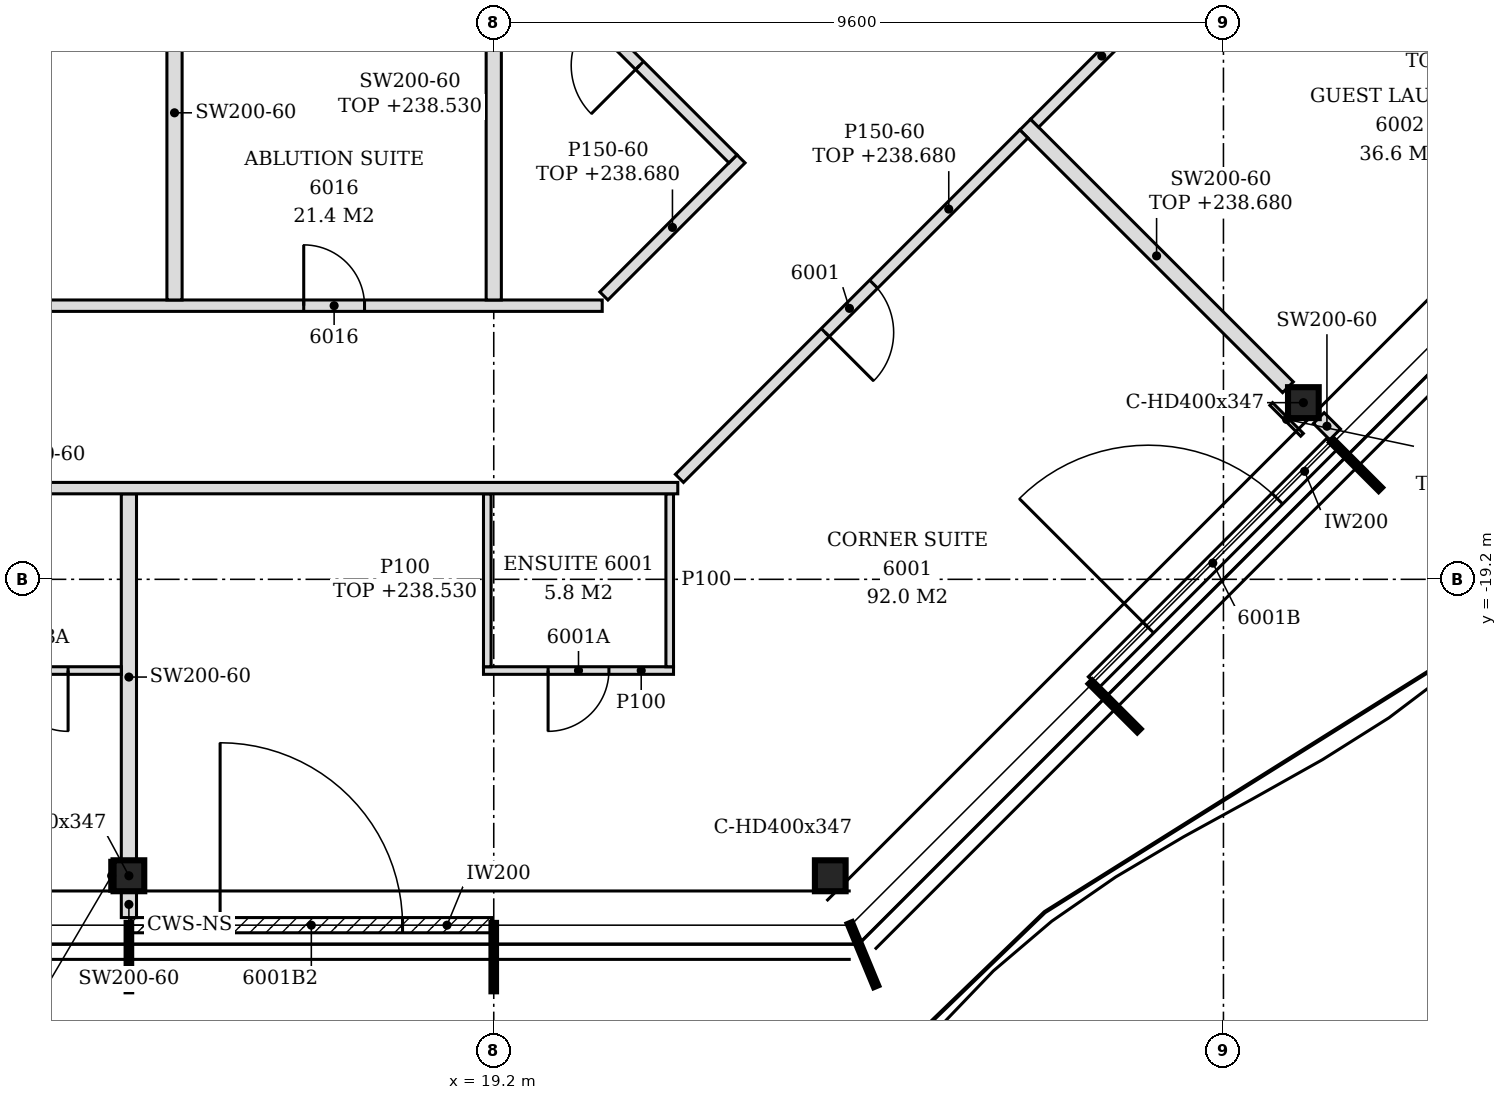
"""IFC4 building model, lengths in metres.
Left out: names, types, materials, properties, quantities, classifications, styles, units other than length and angle.
Written with IfcOpenShell. Run it as: python <this file> out.ifc"""

import sys

from ifc_helpers import new_model, si_unit, direction, frame, frame_2d, origin, origin_2d, place, context, subcontext, project, spatial, polyline, rectangle, i_section, outline, extrude, element, fill, save


model = new_model("IFC4")
c1 = context("Model", 3, precision=1e-05, world=origin(), true_north=direction((0.0, 1.0)))
c2 = subcontext(c1, "Body", "Model", "MODEL_VIEW")
j1 = project(units=[si_unit("LENGTHUNIT", "METRE"), si_unit("PLANEANGLEUNIT", "RADIAN")], contexts=[c1])
p1 = place(None, origin())
s1 = spatial("IfcSite", under=j1, at=p1, CompositionType="ELEMENT")
p2 = place(p1, origin())
s2 = spatial("IfcBuilding", under=s1, at=p2, CompositionType="ELEMENT")
p3 = place(p2, frame((0.0, 0.0, 235.8)))
s3 = spatial("IfcBuildingStorey", under=s2, at=p3, CompositionType="ELEMENT", Elevation=235.8)
for number, where, z_axis, x_axis in (
    (1, (14.4, -23.1, -0.15), (0.0, 0.0, 1.0), (1.0, 0.0, 0.0)),
    (2, (23.627, -23.1, -0.15), (0.0, 0.0, 1.0), (1.0, 0.0, 0.0)),
    (3, (29.852, -16.876, -0.15), (0.0, 0.0, 1.0), (1.0, 0.0, 0.0)),
):
    element("IfcColumn", number, at=place(p3, frame(where, z_axis=z_axis, x_axis=x_axis)), inside=s3, PredefinedType="COLUMN", context=c2, shape_type="SweptSolid", body=[
        extrude(i_section(OverallWidth=0.404, OverallDepth=0.407, WebThickness=0.027, FlangeThickness=0.044, FilletRadius=0.015, at=origin_2d()), origin(), (0.0, 0.0, 1.0), 3.6),
    ])
p4 = place(p3, frame((14.43, -23.75, 0.0), z_axis=(0.0, 0.0, 1.0), x_axis=(1.0, 0.0, 0.0)))
e4 = element("IfcWall", 4, at=p4, inside=s3, PredefinedType="NOTDEFINED", context=c2, shape_type="SweptSolid", body=[
    extrude(rectangle(XDim=4.74, YDim=0.2, at=frame_2d((2.37, 0.0))), origin(), (0.0, 0.0, 1.0), 3.45),
])
p5 = place(p4, frame((1.17, 0.0, 0.0)))
e5 = element("IfcOpeningElement", 5, at=p5, cuts=e4, PredefinedType="OPENING", context=c2, shape_type="SweptSolid", body=[
    extrude(rectangle(XDim=2.4, YDim=2.4, at=frame_2d((1.2, 1.2))), frame((0.0, 0.11, 0.0), z_axis=(0.0, -1.0, 0.0), x_axis=(1.0, 0.0, 0.0)), (0.0, 0.0, 1.0), 0.22),
])
p6 = place(p3, frame((27.093, -20.553, 0.0), z_axis=(0.0, 0.0, 1.0), x_axis=(0.707079231393, 0.707134329907, 0.0)))
e6 = element("IfcWall", 6, at=p6, inside=s3, PredefinedType="NOTDEFINED", context=c2, shape_type="SweptSolid", body=[
    extrude(rectangle(XDim=4.431, YDim=0.2, at=frame_2d((2.215, 0.0))), origin(), (0.0, 0.0, 1.0), 3.45),
])
p7 = place(p6, frame((1.015, 0.0, 0.0)))
e7 = element("IfcOpeningElement", 7, at=p7, cuts=e6, PredefinedType="OPENING", context=c2, shape_type="SweptSolid", body=[
    extrude(rectangle(XDim=2.4, YDim=2.4, at=frame_2d((1.2, 1.2))), frame((0.0, 0.11, 0.0), z_axis=(0.0, -1.0, 0.0), x_axis=(1.0, 0.0, 0.0)), (0.0, 0.0, 1.0), 0.22),
])
p8 = place(p3, frame((14.4, -23.65, 0.0), z_axis=(0.0, 0.0, 1.0), x_axis=(0.0, 1.0, 0.0)))
e8 = element("IfcWall", 8, at=p8, inside=s3, PredefinedType="PARTITIONING", context=c2, shape_type="SweptSolid", body=[
    extrude(rectangle(XDim=0.346, YDim=0.2, at=frame_2d((0.173, 0.0))), origin(), (0.0, 0.0, 1.0), 3.45),
])
p9 = place(p3, frame((14.4, -22.896, 0.0), z_axis=(0.0, 0.0, 1.0), x_axis=(0.0, 1.0, 0.0)))
e9 = element("IfcWall", 9, at=p9, inside=s3, PredefinedType="PARTITIONING", context=c2, shape_type="SweptSolid", body=[
    extrude(outline(polyline([(0.0, 0.0), (4.822, 0.0), (4.822, 3.45), (3.802, 3.45), (3.8, 2.88), (3.592, 2.88), (3.59, 3.45), (0.0, 3.45), (0.0, 0.0)])), frame((0.0, 0.1, 0.0), z_axis=(0.0, -1.0, 0.0), x_axis=(1.0, 0.0, 0.0)), (0.0, 0.0, 1.0), 0.2),
])
p10 = place(p3, frame((11.95, -20.4, 0.0), z_axis=(0.0, 0.0, 1.0), x_axis=(1.0, 0.0, 0.0)))
e10 = element("IfcWall", 10, at=p10, inside=s3, PredefinedType="PARTITIONING", context=c2, shape_type="SweptSolid", body=[
    extrude(rectangle(XDim=2.35, YDim=0.1, at=frame_2d((1.175, 0.0))), origin(), (0.0, 0.0, 1.0), 3.45),
])
p11 = place(p10, frame((0.85, 0.0, 0.0)))
e11 = element("IfcOpeningElement", 11, at=p11, cuts=e10, PredefinedType="OPENING", context=c2, shape_type="SweptSolid", body=[
    extrude(rectangle(XDim=0.8, YDim=2.1, at=frame_2d((0.4, 1.05))), frame((0.0, 0.06, 0.0), z_axis=(0.0, -1.0, 0.0), x_axis=(1.0, 0.0, 0.0)), (0.0, 0.0, 1.0), 0.12),
])
p12 = place(p3, frame((19.065, -20.4, 0.0), z_axis=(0.0, 0.0, 1.0), x_axis=(1.0, 0.0, 0.0)))
e12 = element("IfcWall", 12, at=p12, inside=s3, PredefinedType="PARTITIONING", context=c2, shape_type="SweptSolid", body=[
    extrude(outline(polyline([(0.0, 0.0), (2.5, 0.0), (2.5, 3.45), (0.285, 3.45), (0.283, 2.73), (0.0, 2.73), (0.0, 0.0)])), frame((0.0, 0.05, 0.0), z_axis=(0.0, -1.0, 0.0), x_axis=(1.0, 0.0, 0.0)), (0.0, 0.0, 1.0), 0.1),
])
p13 = place(p12, frame((0.85, 0.0, 0.0)))
e13 = element("IfcOpeningElement", 13, at=p13, cuts=e12, PredefinedType="OPENING", context=c2, shape_type="SweptSolid", body=[
    extrude(rectangle(XDim=0.8, YDim=2.1, at=frame_2d((0.4, 1.05))), frame((0.0, 0.06, 0.0), z_axis=(0.0, -1.0, 0.0), x_axis=(1.0, 0.0, 0.0)), (0.0, 0.0, 1.0), 0.12),
])
p14 = place(p3, frame((19.115, -20.35, 0.0), z_axis=(0.0, 0.0, 1.0), x_axis=(0.0, 1.0, 0.0)))
e14 = element("IfcWall", 14, at=p14, inside=s3, PredefinedType="PARTITIONING", context=c2, shape_type="SweptSolid", body=[
    extrude(rectangle(XDim=2.275, YDim=0.1, at=frame_2d((1.138, 0.0))), origin(), (0.0, 0.0, 1.0), 2.73),
])
p15 = place(p3, frame((21.515, -20.35, 0.0), z_axis=(0.0, 0.0, 1.0), x_axis=(0.0, 1.0, 0.0)))
e15 = element("IfcWall", 15, at=p15, inside=s3, PredefinedType="PARTITIONING", context=c2, shape_type="SweptSolid", body=[
    extrude(outline(polyline([(0.0, 0.0), (2.275, 0.0), (2.275, 3.45), (1.245, 3.45), (1.243, 2.98), (1.055, 2.98), (1.053, 3.45), (0.0, 3.45), (0.0, 0.0)])), frame((0.0, 0.05, 0.0), z_axis=(0.0, -1.0, 0.0), x_axis=(1.0, 0.0, 0.0)), (0.0, 0.0, 1.0), 0.1),
])
p16 = place(p3, frame((-0.726, -18.0, 0.0), z_axis=(0.0, 0.0, 1.0), x_axis=(1.0, 0.0, 0.0)))
e16 = element("IfcWall", 16, at=p16, inside=s3, PredefinedType="PARTITIONING", context=c2, shape_type="SweptSolid", body=[
    extrude(outline(polyline([(0.0, 0.0), (22.347, 0.0), (22.347, 3.45), (20.076, 3.45), (20.074, 2.73), (19.776, 2.73), (19.774, 3.45), (8.076, 3.45), (8.074, 2.73), (7.776, 2.73), (7.774, 3.45), (1.086, 3.45), (1.084, 2.93), (0.512, 2.93), (0.51, 3.45), (0.0, 3.45), (0.0, 0.0)])), frame((0.0, 0.075, 0.0), z_axis=(0.0, -1.0, 0.0), x_axis=(1.0, 0.0, 0.0)), (0.0, 0.0, 1.0), 0.15),
])
p17 = place(p16, frame((5.676, 0.0, 0.0)))
e17 = element("IfcOpeningElement", 17, at=p17, cuts=e16, PredefinedType="OPENING", context=c2, shape_type="SweptSolid", body=[
    extrude(rectangle(XDim=0.9, YDim=2.1, at=frame_2d((0.45, 1.05))), frame((0.0, 0.085, 0.0), z_axis=(0.0, -1.0, 0.0), x_axis=(1.0, 0.0, 0.0)), (0.0, 0.0, 1.0), 0.17),
])
p18 = place(p3, frame((21.643, -17.872, 0.0), z_axis=(0.0, 0.0, 1.0), x_axis=(0.707106781187, 0.707106781187, 0.0)))
e18 = element("IfcWall", 18, at=p18, inside=s3, PredefinedType="PARTITIONING", context=c2, shape_type="SweptSolid", body=[
    extrude(rectangle(XDim=6.408, YDim=0.15, at=frame_2d((3.204, 0.0))), origin(), (0.0, 0.0, 1.0), 2.88),
])
p19 = place(p18, frame((2.713, 0.0, 0.0)))
e19 = element("IfcOpeningElement", 19, at=p19, cuts=e18, PredefinedType="OPENING", context=c2, shape_type="SweptSolid", body=[
    extrude(rectangle(XDim=0.9, YDim=2.1, at=frame_2d((0.45, 1.05))), frame((0.0, 0.085, 0.0), z_axis=(0.0, -1.0, 0.0), x_axis=(1.0, 0.0, 0.0)), (0.0, 0.0, 1.0), 0.17),
])
p20 = place(p3, frame((30.269, -17.293, 0.0), z_axis=(0.0, 0.0, 1.0), x_axis=(-0.707509117806, 0.706704215511, 0.0)))
e20 = element("IfcWall", 20, at=p20, inside=s3, PredefinedType="PARTITIONING", context=c2, shape_type="SweptSolid", body=[
    extrude(rectangle(XDim=0.303, YDim=0.2, at=frame_2d((0.152, 0.0))), origin(), (0.0, 0.0, 1.0), 3.45),
])
p21 = place(p3, frame((29.649, -16.673, 0.0), z_axis=(0.0, 0.0, 1.0), x_axis=(-0.707181695824, 0.707031858612, 0.0)))
e21 = element("IfcWall", 21, at=p21, inside=s3, PredefinedType="PARTITIONING", context=c2, shape_type="SweptSolid", body=[
    extrude(rectangle(XDim=4.888, YDim=0.2, at=frame_2d((2.444, 0.0))), origin(), (0.0, 0.0, 1.0), 2.88),
])
p22 = place(p3, frame((-0.312, -15.6, 0.0), z_axis=(0.0, 0.0, 1.0), x_axis=(1.0, 0.0, 0.0)))
e22 = element("IfcWall", 22, at=p22, inside=s3, PredefinedType="PARTITIONING", context=c2, shape_type="SweptSolid", body=[
    extrude(outline(polyline([(0.0, 0.0), (20.939, 0.0), (20.939, 3.45), (19.662, 3.45), (19.66, 2.73), (19.362, 2.73), (19.36, 3.45), (7.662, 3.45), (7.66, 2.73), (7.362, 2.73), (7.36, 3.45), (0.0, 3.45), (0.0, 0.0)])), frame((0.0, 0.075, 0.0), z_axis=(0.0, -1.0, 0.0), x_axis=(1.0, 0.0, 0.0)), (0.0, 0.0, 1.0), 0.15),
])
p23 = place(p22, frame((17.012, 0.0, 0.0)))
e23 = element("IfcOpeningElement", 23, at=p23, cuts=e22, PredefinedType="OPENING", context=c2, shape_type="SweptSolid", body=[
    extrude(rectangle(XDim=0.8, YDim=2.1, at=frame_2d((0.4, 1.05))), frame((0.0, 0.085, 0.0), z_axis=(0.0, -1.0, 0.0), x_axis=(1.0, 0.0, 0.0)), (0.0, 0.0, 1.0), 0.17),
])
p24 = place(p3, frame((15.0, -15.525, 0.0), z_axis=(0.0, 0.0, 1.0), x_axis=(0.0, 1.0, 0.0)))
e24 = element("IfcWall", 24, at=p24, inside=s3, PredefinedType="PARTITIONING", context=c2, shape_type="SweptSolid", body=[
    extrude(outline(polyline([(0.0, 0.0), (4.925, 0.0), (4.925, 3.45), (1.23, 3.45), (1.228, 2.88), (1.02, 2.88), (1.018, 3.45), (0.0, 3.45), (0.0, 0.0)])), frame((0.0, 0.1, 0.0), z_axis=(0.0, -1.0, 0.0), x_axis=(1.0, 0.0, 0.0)), (0.0, 0.0, 1.0), 0.2),
])
p25 = place(p3, frame((19.2, -15.525, 0.0), z_axis=(0.0, 0.0, 1.0), x_axis=(0.0, 1.0, 0.0)))
e25 = element("IfcWall", 25, at=p25, inside=s3, PredefinedType="PARTITIONING", context=c2, shape_type="SweptSolid", body=[
    extrude(rectangle(XDim=4.815, YDim=0.2, at=frame_2d((2.408, 0.0))), origin(), (0.0, 0.0, 1.0), 2.73),
])
p26 = place(p3, frame((20.649, -15.472, 0.0), z_axis=(0.0, 0.0, 1.0), x_axis=(0.707106781187, 0.707106781187, 0.0)))
e26 = element("IfcWall", 26, at=p26, inside=s3, PredefinedType="PARTITIONING", context=c2, shape_type="SweptSolid", body=[
    extrude(rectangle(XDim=2.551, YDim=0.15, at=frame_2d((1.276, 0.0))), origin(), (0.0, 0.0, 1.0), 2.88),
])
p27 = place(p3, frame((22.347, -13.668, 0.0), z_axis=(0.0, 0.0, 1.0), x_axis=(-0.707106781187, 0.707106781187, 0.0)))
e27 = element("IfcWall", 27, at=p27, inside=s3, PredefinedType="PARTITIONING", context=c2, shape_type="SweptSolid", body=[
    extrude(rectangle(XDim=4.45, YDim=0.15, at=frame_2d((2.225, 0.0))), origin(), (0.0, 0.0, 1.0), 2.73),
])
p28 = place(p27, frame((1.737, 0.0, 0.0)))
e28 = element("IfcOpeningElement", 28, at=p28, cuts=e27, PredefinedType="OPENING", context=c2, shape_type="SweptSolid", body=[
    extrude(rectangle(XDim=0.9, YDim=2.1, at=frame_2d((0.45, 1.05))), frame((0.0, 0.085, 0.0), z_axis=(0.0, -1.0, 0.0), x_axis=(1.0, 0.0, 0.0)), (0.0, 0.0, 1.0), 0.17),
])
p29 = place(p3, frame((26.316, -13.199, 0.0), z_axis=(0.0, 0.0, 1.0), x_axis=(0.707024001185, 0.707189551498, 0.0)))
e29 = element("IfcWall", 29, at=p29, inside=s3, PredefinedType="PARTITIONING", context=c2, shape_type="SweptSolid", body=[
    extrude(rectangle(XDim=5.899, YDim=0.15, at=frame_2d((2.949, 0.0))), origin(), (0.0, 0.0, 1.0), 2.88),
])
p30 = place(p29, frame((2.5, 0.0, 0.0)))
e30 = element("IfcOpeningElement", 30, at=p30, cuts=e29, PredefinedType="OPENING", context=c2, shape_type="SweptSolid", body=[
    extrude(rectangle(XDim=0.9, YDim=2.1, at=frame_2d((0.45, 1.05))), frame((0.0, 0.085, 0.0), z_axis=(0.0, -1.0, 0.0), x_axis=(1.0, 0.0, 0.0)), (0.0, 0.0, 1.0), 0.17),
])
p31 = place(p3, frame((34.581, -12.981, 0.0), z_axis=(0.0, 0.0, 1.0), x_axis=(-0.707133900936, 0.707079660397, 0.0)))
e31 = element("IfcWall", 31, at=p31, inside=s3, PredefinedType="PARTITIONING", context=c2, shape_type="SweptSolid", body=[
    extrude(rectangle(XDim=4.501, YDim=0.2, at=frame_2d((2.25, 0.0))), origin(), (0.0, 0.0, 1.0), 2.63),
])
p32 = place(p3, frame((14.173, -23.303, 0.0), z_axis=(0.0, 0.0, 1.0), x_axis=(0.0, 1.0, 0.0)))
e32 = element("IfcWall", 32, at=p32, inside=s3, PredefinedType="PARTITIONING", context=c2, shape_type="SweptSolid", body=[
    extrude(rectangle(XDim=0.407, YDim=0.05, at=frame_2d((0.204, 0.0))), origin(), (0.0, 0.0, 1.0), 2.93),
])
p33 = place(p3, frame((29.834, -17.299, 0.0), z_axis=(0.0, 0.0, 1.0), x_axis=(-0.707319540847, 0.70689395749, 0.0)))
e33 = element("IfcWall", 33, at=p33, inside=s3, PredefinedType="PARTITIONING", context=c2, shape_type="SweptSolid", body=[
    extrude(rectangle(XDim=0.574, YDim=0.05, at=frame_2d((0.287, 0.0))), origin(), (0.0, 0.0, 1.0), 2.93),
])
p34 = place(p5, origin())
e34 = element("IfcDoor", 34, at=p34, inside=s3, OperationType="SINGLE_SWING_LEFT", PredefinedType="DOOR", context=c2, shape_type="SweptSolid", body=[
    extrude(rectangle(XDim=2.4, YDim=2.4, at=frame_2d((1.2, 1.2))), frame((0.0, 0.025, 0.0), z_axis=(0.0, -1.0, 0.0), x_axis=(1.0, 0.0, 0.0)), (0.0, 0.0, 1.0), 0.05),
])
fill(e5, e34)
p35 = place(p7, origin())
e35 = element("IfcDoor", 35, at=p35, inside=s3, OperationType="SINGLE_SWING_LEFT", PredefinedType="DOOR", context=c2, shape_type="SweptSolid", body=[
    extrude(rectangle(XDim=2.4, YDim=2.4, at=frame_2d((1.2, 1.2))), frame((0.0, 0.025, 0.0), z_axis=(0.0, -1.0, 0.0), x_axis=(1.0, 0.0, 0.0)), (0.0, 0.0, 1.0), 0.05),
])
fill(e7, e35)
p36 = place(p19, frame((0.9, 0.0, 0.0), z_axis=(0.0, 0.0, 1.0), x_axis=(-1.0, 0.0, 0.0)))
e36 = element("IfcDoor", 36, at=p36, inside=s3, OperationType="SINGLE_SWING_RIGHT", PredefinedType="DOOR", context=c2, shape_type="SweptSolid", body=[
    extrude(rectangle(XDim=0.9, YDim=2.1, at=frame_2d((0.45, 1.05))), frame((0.0, 0.025, 0.0), z_axis=(0.0, -1.0, 0.0), x_axis=(1.0, 0.0, 0.0)), (0.0, 0.0, 1.0), 0.05),
])
fill(e19, e36)
p37 = place(p13, frame((0.8, 0.0, 0.0), z_axis=(0.0, 0.0, 1.0), x_axis=(-1.0, 0.0, 0.0)))
e37 = element("IfcDoor", 37, at=p37, inside=s3, OperationType="SINGLE_SWING_RIGHT", PredefinedType="DOOR", context=c2, shape_type="SweptSolid", body=[
    extrude(rectangle(XDim=0.8, YDim=2.1, at=frame_2d((0.4, 1.05))), frame((0.0, 0.025, 0.0), z_axis=(0.0, -1.0, 0.0), x_axis=(1.0, 0.0, 0.0)), (0.0, 0.0, 1.0), 0.05),
])
fill(e13, e37)
p38 = place(p11, frame((0.8, 0.0, 0.0), z_axis=(0.0, 0.0, 1.0), x_axis=(-1.0, 0.0, 0.0)))
e38 = element("IfcDoor", 38, at=p38, inside=s3, OperationType="SINGLE_SWING_LEFT", PredefinedType="DOOR", context=c2, shape_type="SweptSolid", body=[
    extrude(rectangle(XDim=0.8, YDim=2.1, at=frame_2d((0.4, 1.05))), frame((0.0, 0.025, 0.0), z_axis=(0.0, -1.0, 0.0), x_axis=(1.0, 0.0, 0.0)), (0.0, 0.0, 1.0), 0.05),
])
fill(e11, e38)
p39 = place(p23, origin())
e39 = element("IfcDoor", 39, at=p39, inside=s3, OperationType="SINGLE_SWING_LEFT", PredefinedType="DOOR", context=c2, shape_type="SweptSolid", body=[
    extrude(rectangle(XDim=0.8, YDim=2.1, at=frame_2d((0.4, 1.05))), frame((0.0, 0.025, 0.0), z_axis=(0.0, -1.0, 0.0), x_axis=(1.0, 0.0, 0.0)), (0.0, 0.0, 1.0), 0.05),
])
fill(e23, e39)
p40 = place(p28, origin())
e40 = element("IfcDoor", 40, at=p40, inside=s3, OperationType="SINGLE_SWING_LEFT", PredefinedType="DOOR", context=c2, shape_type="SweptSolid", body=[
    extrude(rectangle(XDim=0.9, YDim=2.1, at=frame_2d((0.45, 1.05))), frame((0.0, 0.025, 0.0), z_axis=(0.0, -1.0, 0.0), x_axis=(1.0, 0.0, 0.0)), (0.0, 0.0, 1.0), 0.05),
])
fill(e28, e40)
save(model, sys.argv[1])
